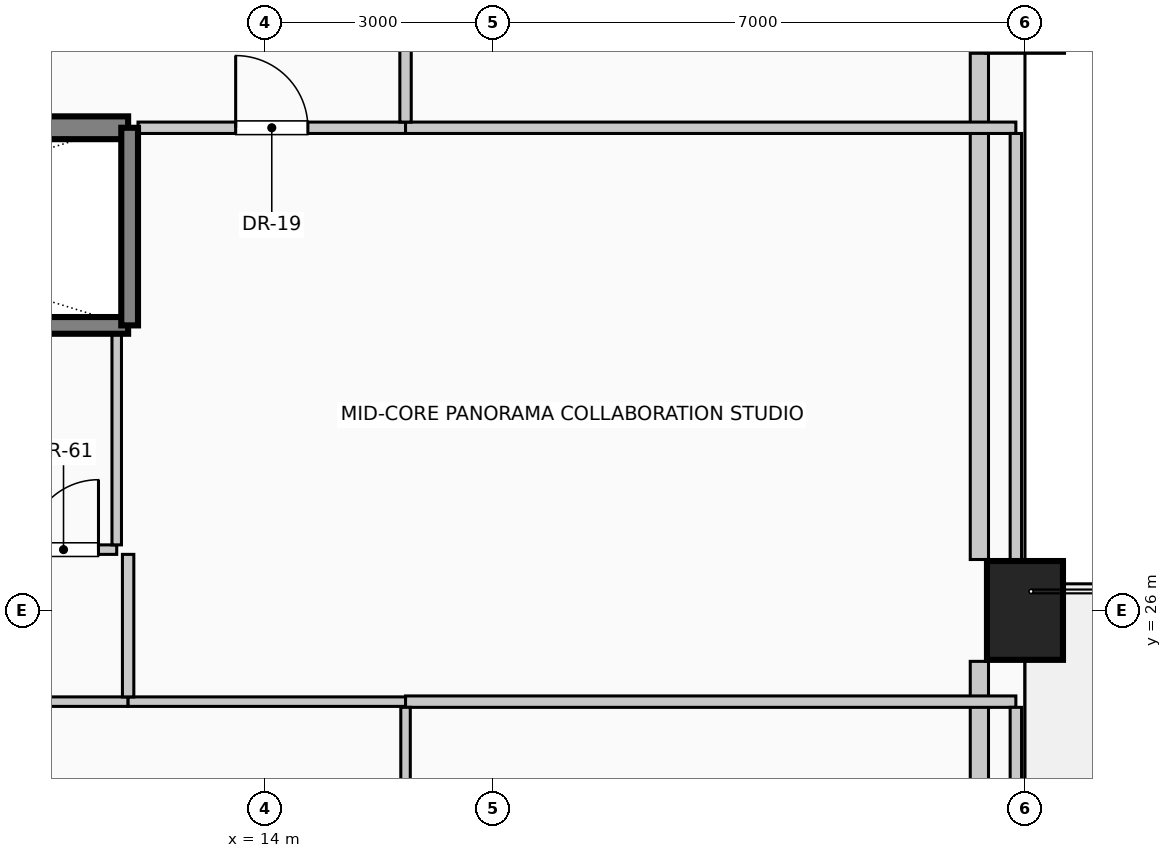
"""IFC4 building model, lengths in metres.
Left out: names, types, materials, properties, quantities, classifications, styles, units other than length and angle.
Written with IfcOpenShell. Run it as: python <this file> out.ifc"""

import sys

from ifc_helpers import new_model, si_unit, direction, frame, frame_2d, origin, origin_2d, place, context, subcontext, project, spatial, rectangle, extrude, element, fill, save


model = new_model("IFC4")
c1 = context("Model", 3, precision=1e-05, world=origin(), true_north=direction((0.0, 1.0)))
c2 = subcontext(c1, "Body", "Model", "MODEL_VIEW")
j1 = project(units=[si_unit("LENGTHUNIT", "METRE"), si_unit("PLANEANGLEUNIT", "RADIAN")], contexts=[c1])
p1 = place(None, origin())
s1 = spatial("IfcSite", under=j1, at=p1, CompositionType="ELEMENT")
p2 = place(p1, origin())
s2 = spatial("IfcBuilding", under=s1, at=p2, CompositionType="ELEMENT")
p3 = place(p2, frame((0.0, 0.0, 182.6)))
s3 = spatial("IfcBuildingStorey", under=s2, at=p3, CompositionType="ELEMENT", Elevation=182.6)
for number, where, z_axis, x_axis in (
    (1, (24.0, 26.0, 0.0), (0.0, 0.0, 1.0), (1.0, 0.0, 0.0)),
    (2, (24.0, 34.0, 0.0), (0.0, 0.0, 1.0), (1.0, 0.0, 0.0)),
):
    element("IfcColumn", number, at=place(p3, frame(where, z_axis=z_axis, x_axis=x_axis)), inside=s3, PredefinedType="COLUMN", context=c2, shape_type="SweptSolid", body=[
        extrude(rectangle(XDim=1.0, YDim=1.3, at=origin_2d()), origin(), (0.0, 0.0, 1.0), 4.0),
    ])
for number, where, z_axis, x_axis in (
    (3, (23.4, 25.33, 0.0), (0.0, 0.0, 1.0), (0.0, -1.0, 0.0)),
    (4, (23.4, 33.33, 0.0), (0.0, 0.0, 1.0), (0.0, -1.0, 0.0)),
):
    element("IfcWall", number, at=place(p3, frame(where, z_axis=z_axis, x_axis=x_axis)), inside=s3, PredefinedType="SOLIDWALL", context=c2, shape_type="SweptSolid", body=[
        extrude(rectangle(XDim=6.66, YDim=0.24, at=frame_2d((3.33, 0.0))), origin(), (0.0, 0.0, 1.0), 3.75),
    ])
p4 = place(p3, frame((10.05, 32.35, 0.0), z_axis=(0.0, 0.0, 1.0), x_axis=(1.0, 0.0, 0.0)))
e5 = element("IfcWall", 5, at=p4, inside=s3, PredefinedType="SOLIDWALL", context=c2, shape_type="SweptSolid", body=[
    extrude(rectangle(XDim=2.15, YDim=0.3, at=frame_2d((1.075, 0.0))), origin(), (0.0, 0.0, 1.0), 4.0),
])
p5 = place(p3, frame((3.55, 29.75, 0.0), z_axis=(0.0, 0.0, 1.0), x_axis=(1.0, 0.0, 0.0)))
e6 = element("IfcWall", 6, at=p5, inside=s3, PredefinedType="SOLIDWALL", context=c2, shape_type="SweptSolid", body=[
    extrude(rectangle(XDim=8.65, YDim=0.22, at=frame_2d((4.325, 0.0))), origin(), (0.0, 0.0, 1.0), 4.0),
])
p6 = place(p3, frame((12.22, 29.75, 0.0), z_axis=(0.0, 0.0, 1.0), x_axis=(0.0, 1.0, 0.0)))
e7 = element("IfcWall", 7, at=p6, inside=s3, PredefinedType="SOLIDWALL", context=c2, shape_type="SweptSolid", body=[
    extrude(rectangle(XDim=2.6, YDim=0.22, at=frame_2d((1.3, 0.0))), origin(), (0.0, 0.0, 1.0), 4.0),
])
p7 = place(p3, frame((9.8, 24.8, 0.0), z_axis=(0.0, 0.0, 1.0), x_axis=(1.0, 0.0, 0.0)))
e8 = element("IfcWall", 8, at=p7, inside=s3, PredefinedType="PARTITIONING", context=c2, shape_type="SweptSolid", body=[
    extrude(rectangle(XDim=2.4, YDim=0.125, at=frame_2d((1.2, 0.0))), origin(), (0.0, 0.0, 1.0), 3.75),
])
p8 = place(p3, frame((12.2, 24.8, 0.0), z_axis=(0.0, 0.0, 1.0), x_axis=(1.0, 0.0, 0.0)))
e9 = element("IfcWall", 9, at=p8, inside=s3, PredefinedType="PARTITIONING", context=c2, shape_type="SweptSolid", body=[
    extrude(rectangle(XDim=3.65, YDim=0.125, at=frame_2d((1.825, 0.0))), origin(), (0.0, 0.0, 1.0), 3.75),
])
p9 = place(p3, frame((15.85, 24.8, 0.0), z_axis=(0.0, 0.0, 1.0), x_axis=(1.0, 0.0, 0.0)))
e10 = element("IfcWall", 10, at=p9, inside=s3, PredefinedType="PARTITIONING", context=c2, shape_type="SweptSolid", body=[
    extrude(rectangle(XDim=8.03, YDim=0.15, at=frame_2d((4.015, 0.0))), origin(), (0.0, 0.0, 1.0), 3.75),
])
p10 = place(p3, frame((10.65, 26.8, 0.0), z_axis=(0.0, 0.0, 1.0), x_axis=(1.0, 0.0, 0.0)))
e11 = element("IfcWall", 11, at=p10, inside=s3, PredefinedType="PARTITIONING", context=c2, shape_type="SweptSolid", body=[
    extrude(rectangle(XDim=1.4, YDim=0.125, at=frame_2d((0.7, 0.0))), origin(), (0.0, 0.0, 1.0), 3.75),
])
p11 = place(p10, frame((0.24, 0.0, 0.0)))
e12 = element("IfcOpeningElement", 12, at=p11, cuts=e11, PredefinedType="OPENING", context=c2, shape_type="SweptSolid", body=[
    extrude(rectangle(XDim=0.92, YDim=2.1, at=frame_2d((0.46, 1.05))), frame((0.0, 0.073, 0.0), z_axis=(0.0, -1.0, 0.0), x_axis=(1.0, 0.0, 0.0)), (0.0, 0.0, 1.0), 0.145),
])
p12 = place(p3, frame((12.33, 32.35, 0.0), z_axis=(0.0, 0.0, 1.0), x_axis=(1.0, 0.0, 0.0)))
e13 = element("IfcWall", 13, at=p12, inside=s3, PredefinedType="PARTITIONING", context=c2, shape_type="SweptSolid", body=[
    extrude(rectangle(XDim=3.52, YDim=0.15, at=frame_2d((1.76, 0.0))), origin(), (0.0, 0.0, 1.0), 3.75),
])
p13 = place(p12, frame((1.285, 0.0, 0.0)))
e14 = element("IfcOpeningElement", 14, at=p13, cuts=e13, PredefinedType="OPENING", context=c2, shape_type="SweptSolid", body=[
    extrude(rectangle(XDim=0.95, YDim=2.15, at=frame_2d((0.475, 1.075))), frame((0.0, 0.085, 0.0), z_axis=(0.0, -1.0, 0.0), x_axis=(1.0, 0.0, 0.0)), (0.0, 0.0, 1.0), 0.17),
])
p14 = place(p3, frame((15.85, 32.35, 0.0), z_axis=(0.0, 0.0, 1.0), x_axis=(1.0, 0.0, 0.0)))
e15 = element("IfcWall", 15, at=p14, inside=s3, PredefinedType="PARTITIONING", context=c2, shape_type="SweptSolid", body=[
    extrude(rectangle(XDim=8.03, YDim=0.15, at=frame_2d((4.015, 0.0))), origin(), (0.0, 0.0, 1.0), 3.75),
])
p15 = place(p3, frame((12.05, 26.863, 0.0), z_axis=(0.0, 0.0, 1.0), x_axis=(0.0, 1.0, 0.0)))
e16 = element("IfcWall", 16, at=p15, inside=s3, PredefinedType="PARTITIONING", context=c2, shape_type="SweptSolid", body=[
    extrude(rectangle(XDim=2.777, YDim=0.125, at=frame_2d((1.389, 0.0))), origin(), (0.0, 0.0, 1.0), 3.75),
])
p16 = place(p3, frame((12.2, 24.863, 0.0), z_axis=(0.0, 0.0, 1.0), x_axis=(0.0, 1.0, 0.0)))
e17 = element("IfcWall", 17, at=p16, inside=s3, PredefinedType="PARTITIONING", context=c2, shape_type="SweptSolid", body=[
    extrude(rectangle(XDim=1.875, YDim=0.15, at=frame_2d((0.938, 0.0))), origin(), (0.0, 0.0, 1.0), 3.75),
])
p17 = place(p3, frame((15.85, 17.39, 0.0), z_axis=(0.0, 0.0, 1.0), x_axis=(0.0, 1.0, 0.0)))
e18 = element("IfcWall", 18, at=p17, inside=s3, PredefinedType="PARTITIONING", context=c2, shape_type="SweptSolid", body=[
    extrude(rectangle(XDim=7.335, YDim=0.125, at=frame_2d((3.667, 0.0))), origin(), (0.0, 0.0, 1.0), 3.75),
])
p18 = place(p3, frame((15.85, 32.425, 0.0), z_axis=(0.0, 0.0, 1.0), x_axis=(0.0, 1.0, 0.0)))
e19 = element("IfcWall", 19, at=p18, inside=s3, PredefinedType="PARTITIONING", context=c2, shape_type="SweptSolid", body=[
    extrude(rectangle(XDim=1.725, YDim=0.15, at=frame_2d((0.862, 0.0))), origin(), (0.0, 0.0, 1.0), 3.75),
])
p19 = place(p3, frame((23.88, 18.65, 0.0), z_axis=(0.0, 0.0, 1.0), x_axis=(0.0, 1.0, 0.0)))
e20 = element("IfcWall", 20, at=p19, inside=s3, PredefinedType="PARTITIONING", context=c2, shape_type="SweptSolid", body=[
    extrude(rectangle(XDim=6.075, YDim=0.15, at=frame_2d((3.038, 0.0))), origin(), (0.0, 0.0, 1.0), 3.145),
])
p20 = place(p3, frame((23.88, 26.65, 0.0), z_axis=(0.0, 0.0, 1.0), x_axis=(0.0, 1.0, 0.0)))
e21 = element("IfcWall", 21, at=p20, inside=s3, PredefinedType="PARTITIONING", context=c2, shape_type="SweptSolid", body=[
    extrude(rectangle(XDim=5.625, YDim=0.15, at=frame_2d((2.812, 0.0))), origin(), (0.0, 0.0, 1.0), 3.145),
])
p21 = place(p11, origin())
e22 = element("IfcDoor", 22, at=p21, inside=s3, OperationType="SINGLE_SWING_RIGHT", PredefinedType="DOOR", context=c2, shape_type="SweptSolid", body=[
    extrude(rectangle(XDim=0.92, YDim=2.1, at=frame_2d((0.46, 1.05))), frame((0.0, 0.025, 0.0), z_axis=(0.0, -1.0, 0.0), x_axis=(1.0, 0.0, 0.0)), (0.0, 0.0, 1.0), 0.05),
])
fill(e12, e22)
p22 = place(p13, origin())
e23 = element("IfcDoor", 23, at=p22, inside=s3, OperationType="SINGLE_SWING_LEFT", PredefinedType="DOOR", context=c2, shape_type="SweptSolid", body=[
    extrude(rectangle(XDim=0.95, YDim=2.15, at=frame_2d((0.475, 1.075))), frame((0.0, 0.025, 0.0), z_axis=(0.0, -1.0, 0.0), x_axis=(1.0, 0.0, 0.0)), (0.0, 0.0, 1.0), 0.05),
])
fill(e14, e23)
save(model, sys.argv[1])
